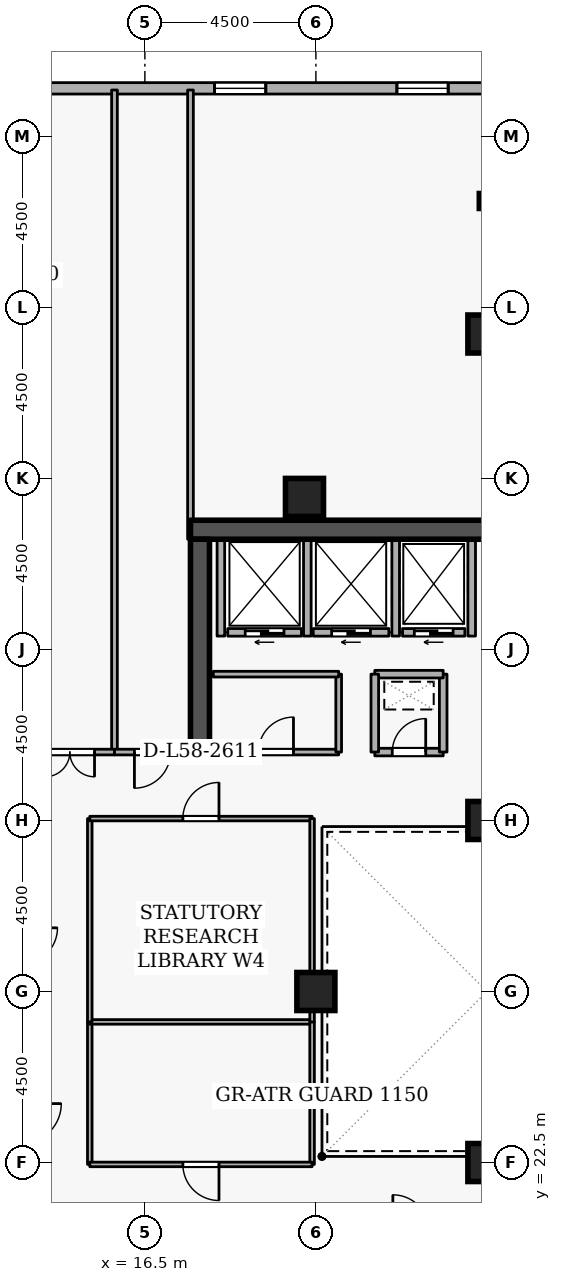
"""IFC4 building model, lengths in metres.
Left out: names, types, materials, properties, quantities, classifications, styles, units other than length and angle.
Written with IfcOpenShell. Run it as: python <this file> out.ifc"""

import sys

from ifc_helpers import new_model, si_unit, direction, frame, frame_2d, origin, origin_2d, place, context, subcontext, project, spatial, rectangle, i_section, extrude, element, fill, save


model = new_model("IFC4")
c1 = context("Model", 3, precision=1e-05, world=origin(), true_north=direction((0.0, 1.0)))
c2 = subcontext(c1, "Body", "Model", "MODEL_VIEW")
j1 = project(units=[si_unit("LENGTHUNIT", "METRE"), si_unit("PLANEANGLEUNIT", "RADIAN")], contexts=[c1])
p1 = place(None, origin())
s1 = spatial("IfcSite", under=j1, at=p1, CompositionType="ELEMENT")
p2 = place(p1, origin())
s2 = spatial("IfcBuilding", under=s1, at=p2, CompositionType="ELEMENT")
p3 = place(p2, frame((0.0, 0.0, 218.1)))
s3 = spatial("IfcBuildingStorey", under=s2, at=p3, CompositionType="ELEMENT", Elevation=218.1)
p4 = place(p3, frame((17.7, 39.15, 0.0), z_axis=(0.0, 0.0, 1.0), x_axis=(1.0, 0.0, 0.0)))
e1 = element("IfcWall", 1, at=p4, inside=s3, PredefinedType="SHEAR", context=c2, shape_type="SweptSolid", body=[
    extrude(rectangle(XDim=15.6, YDim=0.5, at=frame_2d((7.8, 0.0))), origin(), (0.0, 0.0, 1.0), 3.6),
])
p5 = place(p3, frame((17.95, 33.1, 0.0), z_axis=(0.0, 0.0, 1.0), x_axis=(0.0, 1.0, 0.0)))
e2 = element("IfcWall", 2, at=p5, inside=s3, PredefinedType="SHEAR", context=c2, shape_type="SweptSolid", body=[
    extrude(rectangle(XDim=5.8, YDim=0.5, at=frame_2d((2.9, 0.0))), origin(), (0.0, 0.0, 1.0), 3.6),
])
for number, where, z_axis, x_axis in (
    (3, (25.5, 44.3, 0.0), (0.0, 0.0, 1.0), (1.0, 0.0, 0.0)),
    (4, (20.7, 40.0, 0.0), (0.0, 0.0, 1.0), (1.0, 0.0, 0.0)),
    (5, (25.5, 22.5, 0.0), (0.0, 0.0, 1.0), (1.0, 0.0, 0.0)),
    (6, (25.5, 31.5, 0.0), (0.0, 0.0, 1.0), (1.0, 0.0, 0.0)),
    (7, (21.0, 27.0, 0.0), (0.0, 0.0, 1.0), (1.0, 0.0, 0.0)),
):
    element("IfcColumn", number, at=place(p3, frame(where, z_axis=z_axis, x_axis=x_axis)), inside=s3, PredefinedType="COLUMN", context=c2, shape_type="SweptSolid", body=[
        extrude(rectangle(XDim=1.0, YDim=1.0, at=origin_2d()), origin(), (0.0, 0.0, 1.0), 3.6),
    ])
p6 = place(p3, frame((25.5, 47.8, 0.0), z_axis=(0.0, 0.0, 1.0), x_axis=(1.0, 0.0, 0.0)))
e8 = element("IfcColumn", 8, at=p6, inside=s3, PredefinedType="COLUMN", context=c2, shape_type="SweptSolid", body=[
    extrude(i_section(OverallWidth=0.399, OverallDepth=0.394, WebThickness=0.023, FlangeThickness=0.037, FilletRadius=0.015, at=origin_2d()), origin(), (0.0, 0.0, 1.0), 3.6),
])
p7 = place(p3, frame((40.681, 50.765, 0.0), z_axis=(0.0, 0.0, 1.0), x_axis=(-0.999999999634, -2.7061402e-05, 0.0)))
e9 = element("IfcWall", 9, at=p7, inside=s3, PredefinedType="STANDARD", context=c2, shape_type="SweptSolid", body=[
    extrude(rectangle(XDim=36.087, YDim=0.3, at=frame_2d((18.043, 0.0))), origin(), (0.0, 0.0, 1.0), 2.66),
])
p8 = place(p7, frame((1.8, 0.0, 0.72)))
e10 = element("IfcOpeningElement", 10, at=p8, cuts=e9, PredefinedType="OPENING", context=c2, shape_type="SweptSolid", body=[
    extrude(rectangle(XDim=1.35, YDim=1.05, at=frame_2d((0.675, 0.525))), frame((0.0, 0.16, 0.0), z_axis=(0.0, -1.0, 0.0), x_axis=(1.0, 0.0, 0.0)), (0.0, 0.0, 1.0), 0.32),
])
p9 = place(p7, frame((6.6, 0.0, 0.72)))
e11 = element("IfcOpeningElement", 11, at=p9, cuts=e9, PredefinedType="OPENING", context=c2, shape_type="SweptSolid", body=[
    extrude(rectangle(XDim=1.35, YDim=1.05, at=frame_2d((0.675, 0.525))), frame((0.0, 0.16, 0.0), z_axis=(0.0, -1.0, 0.0), x_axis=(1.0, 0.0, 0.0)), (0.0, 0.0, 1.0), 0.32),
])
p10 = place(p7, frame((11.4, 0.0, 0.72)))
e12 = element("IfcOpeningElement", 12, at=p10, cuts=e9, PredefinedType="OPENING", context=c2, shape_type="SweptSolid", body=[
    extrude(rectangle(XDim=1.35, YDim=1.05, at=frame_2d((0.675, 0.525))), frame((0.0, 0.16, 0.0), z_axis=(0.0, -1.0, 0.0), x_axis=(1.0, 0.0, 0.0)), (0.0, 0.0, 1.0), 0.32),
])
p11 = place(p7, frame((16.2, 0.0, 0.72)))
e13 = element("IfcOpeningElement", 13, at=p11, cuts=e9, PredefinedType="OPENING", context=c2, shape_type="SweptSolid", body=[
    extrude(rectangle(XDim=1.35, YDim=1.05, at=frame_2d((0.675, 0.525))), frame((0.0, 0.16, 0.0), z_axis=(0.0, -1.0, 0.0), x_axis=(1.0, 0.0, 0.0)), (0.0, 0.0, 1.0), 0.32),
])
p12 = place(p7, frame((21.0, 0.0, 0.72)))
e14 = element("IfcOpeningElement", 14, at=p12, cuts=e9, PredefinedType="OPENING", context=c2, shape_type="SweptSolid", body=[
    extrude(rectangle(XDim=1.35, YDim=1.05, at=frame_2d((0.675, 0.525))), frame((0.0, 0.16, 0.0), z_axis=(0.0, -1.0, 0.0), x_axis=(1.0, 0.0, 0.0)), (0.0, 0.0, 1.0), 0.32),
])
p13 = place(p7, frame((30.6, 0.0, 0.72)))
e15 = element("IfcOpeningElement", 15, at=p13, cuts=e9, PredefinedType="OPENING", context=c2, shape_type="SweptSolid", body=[
    extrude(rectangle(XDim=1.35, YDim=1.05, at=frame_2d((0.675, 0.525))), frame((0.0, 0.16, 0.0), z_axis=(0.0, -1.0, 0.0), x_axis=(1.0, 0.0, 0.0)), (0.0, 0.0, 1.0), 0.32),
])
p14 = place(p3, frame((24.92, 36.45, 0.0), z_axis=(0.0, 0.0, 1.0), x_axis=(-1.0, 0.0, 0.0)))
e16 = element("IfcWall", 16, at=p14, inside=s3, PredefinedType="STANDARD", context=c2, shape_type="SweptSolid", body=[
    extrude(rectangle(XDim=1.64, YDim=0.2, at=frame_2d((0.82, 0.0))), origin(), (0.0, 0.0, 1.0), 3.26),
])
p15 = place(p14, frame((0.31, 0.0, 0.0)))
e17 = element("IfcOpeningElement", 17, at=p15, cuts=e16, PredefinedType="OPENING", context=c2, shape_type="SweptSolid", body=[
    extrude(rectangle(XDim=1.02, YDim=2.06, at=frame_2d((0.51, 1.03))), frame((0.0, 0.11, 0.0), z_axis=(0.0, -1.0, 0.0), x_axis=(1.0, 0.0, 0.0)), (0.0, 0.0, 1.0), 0.22),
])
p16 = place(p3, frame((22.92, 36.45, 0.0), z_axis=(0.0, 0.0, 1.0), x_axis=(-1.0, 0.0, 0.0)))
e18 = element("IfcWall", 18, at=p16, inside=s3, PredefinedType="STANDARD", context=c2, shape_type="SweptSolid", body=[
    extrude(rectangle(XDim=1.99, YDim=0.2, at=frame_2d((0.995, 0.0))), origin(), (0.0, 0.0, 1.0), 3.26),
])
p17 = place(p16, frame((0.485, 0.0, 0.0)))
e19 = element("IfcOpeningElement", 19, at=p17, cuts=e18, PredefinedType="OPENING", context=c2, shape_type="SweptSolid", body=[
    extrude(rectangle(XDim=1.02, YDim=2.06, at=frame_2d((0.51, 1.03))), frame((0.0, 0.11, 0.0), z_axis=(0.0, -1.0, 0.0), x_axis=(1.0, 0.0, 0.0)), (0.0, 0.0, 1.0), 0.22),
])
p18 = place(p3, frame((20.62, 36.45, 0.0), z_axis=(0.0, 0.0, 1.0), x_axis=(-1.0, 0.0, 0.0)))
e20 = element("IfcWall", 20, at=p18, inside=s3, PredefinedType="STANDARD", context=c2, shape_type="SweptSolid", body=[
    extrude(rectangle(XDim=1.94, YDim=0.2, at=frame_2d((0.97, 0.0))), origin(), (0.0, 0.0, 1.0), 3.26),
])
p19 = place(p18, frame((0.46, 0.0, 0.0)))
e21 = element("IfcOpeningElement", 21, at=p19, cuts=e20, PredefinedType="OPENING", context=c2, shape_type="SweptSolid", body=[
    extrude(rectangle(XDim=1.02, YDim=2.06, at=frame_2d((0.51, 1.03))), frame((0.0, 0.11, 0.0), z_axis=(0.0, -1.0, 0.0), x_axis=(1.0, 0.0, 0.0)), (0.0, 0.0, 1.0), 0.22),
])
for number, where, z_axis, x_axis in (
    (22, (25.1, 36.352, 0.0), (0.0, 0.0, 1.0), (0.0, 1.0, 0.0)),
    (23, (23.1, 36.352, 0.0), (0.0, 0.0, 1.0), (0.0, 1.0, 0.0)),
    (24, (20.775, 36.352, 0.0), (0.0, 0.0, 1.0), (0.0, 1.0, 0.0)),
    (25, (18.5, 36.352, 0.0), (0.0, 0.0, 1.0), (0.0, 1.0, 0.0)),
):
    element("IfcWall", number, at=place(p3, frame(where, z_axis=z_axis, x_axis=x_axis)), inside=s3, PredefinedType="STANDARD", context=c2, shape_type="SweptSolid", body=[
        extrude(rectangle(XDim=2.536, YDim=0.2, at=frame_2d((1.268, 0.0))), origin(), (0.0, 0.0, 1.0), 3.26),
    ])
p20 = place(p3, frame((22.55, 33.3, 0.0), z_axis=(0.0, 0.0, 1.0), x_axis=(1.0, 0.0, 0.0)))
e26 = element("IfcWall", 26, at=p20, inside=s3, PredefinedType="STANDARD", context=c2, shape_type="SweptSolid", body=[
    extrude(rectangle(XDim=1.8, YDim=0.2, at=frame_2d((0.9, 0.0))), origin(), (0.0, 0.0, 1.0), 3.26),
])
p21 = place(p20, frame((0.46, 0.0, 0.0)))
e27 = element("IfcOpeningElement", 27, at=p21, cuts=e26, PredefinedType="OPENING", context=c2, shape_type="SweptSolid", body=[
    extrude(rectangle(XDim=0.88, YDim=2.04, at=frame_2d((0.44, 1.02))), frame((0.0, 0.11, 0.0), z_axis=(0.0, -1.0, 0.0), x_axis=(1.0, 0.0, 0.0)), (0.0, 0.0, 1.0), 0.22),
])
p22 = place(p3, frame((24.35, 33.3, 0.0), z_axis=(0.0, 0.0, 1.0), x_axis=(0.0, 1.0, 0.0)))
e28 = element("IfcWall", 28, at=p22, inside=s3, PredefinedType="STANDARD", context=c2, shape_type="SweptSolid", body=[
    extrude(rectangle(XDim=2.05, YDim=0.2, at=frame_2d((1.025, 0.0))), origin(), (0.0, 0.0, 1.0), 3.26),
])
p23 = place(p3, frame((24.35, 35.35, 0.0), z_axis=(0.0, 0.0, 1.0), x_axis=(-1.0, 0.0, 0.0)))
e29 = element("IfcWall", 29, at=p23, inside=s3, PredefinedType="STANDARD", context=c2, shape_type="SweptSolid", body=[
    extrude(rectangle(XDim=1.8, YDim=0.2, at=frame_2d((0.9, 0.0))), origin(), (0.0, 0.0, 1.0), 3.26),
])
p24 = place(p3, frame((22.55, 35.35, 0.0), z_axis=(0.0, 0.0, 1.0), x_axis=(0.0, -1.0, 0.0)))
e30 = element("IfcWall", 30, at=p24, inside=s3, PredefinedType="STANDARD", context=c2, shape_type="SweptSolid", body=[
    extrude(rectangle(XDim=2.05, YDim=0.2, at=frame_2d((1.025, 0.0))), origin(), (0.0, 0.0, 1.0), 3.26),
])
p25 = place(p3, frame((18.3, 33.3, 0.0), z_axis=(0.0, 0.0, 1.0), x_axis=(1.0, 0.0, 0.0)))
e31 = element("IfcWall", 31, at=p25, inside=s3, PredefinedType="PARTITIONING", context=c2, shape_type="SweptSolid", body=[
    extrude(rectangle(XDim=3.3, YDim=0.15, at=frame_2d((1.65, 0.0))), origin(), (0.0, 0.0, 1.0), 3.26),
])
p26 = place(p25, frame((1.19, 0.0, 0.0)))
e32 = element("IfcOpeningElement", 32, at=p26, cuts=e31, PredefinedType="OPENING", context=c2, shape_type="SweptSolid", body=[
    extrude(rectangle(XDim=0.92, YDim=2.08, at=frame_2d((0.46, 1.04))), frame((0.0, 0.085, 0.0), z_axis=(0.0, -1.0, 0.0), x_axis=(1.0, 0.0, 0.0)), (0.0, 0.0, 1.0), 0.17),
])
p27 = place(p3, frame((21.6, 33.3, 0.0), z_axis=(0.0, 0.0, 1.0), x_axis=(0.0, 1.0, 0.0)))
e33 = element("IfcWall", 33, at=p27, inside=s3, PredefinedType="PARTITIONING", context=c2, shape_type="SweptSolid", body=[
    extrude(rectangle(XDim=2.05, YDim=0.15, at=frame_2d((1.025, 0.0))), origin(), (0.0, 0.0, 1.0), 3.26),
])
p28 = place(p3, frame((21.6, 35.35, 0.0), z_axis=(0.0, 0.0, 1.0), x_axis=(-1.0, 0.0, 0.0)))
e34 = element("IfcWall", 34, at=p28, inside=s3, PredefinedType="PARTITIONING", context=c2, shape_type="SweptSolid", body=[
    extrude(rectangle(XDim=3.3, YDim=0.15, at=frame_2d((1.65, 0.0))), origin(), (0.0, 0.0, 1.0), 3.26),
])
p29 = place(p3, frame((15.7, 50.72, 0.0), z_axis=(0.0, 0.0, 1.0), x_axis=(0.0, -1.0, 0.0)))
e35 = element("IfcWall", 35, at=p29, inside=s3, PredefinedType="PARTITIONING", context=c2, shape_type="SweptSolid", body=[
    extrude(rectangle(XDim=17.42, YDim=0.15, at=frame_2d((8.71, 0.0))), origin(), (0.0, 0.0, 1.0), 3.26),
])
p30 = place(p3, frame((15.7, 33.3, 0.0), z_axis=(0.0, 0.0, 1.0), x_axis=(-1.0, 0.0, 0.0)))
e36 = element("IfcWall", 36, at=p30, inside=s3, PredefinedType="PARTITIONING", context=c2, shape_type="SweptSolid", body=[
    extrude(rectangle(XDim=2.35, YDim=0.15, at=frame_2d((1.175, 0.0))), origin(), (0.0, 0.0, 1.0), 3.26),
])
p31 = place(p30, frame((0.525, 0.0, 0.0)))
e37 = element("IfcOpeningElement", 37, at=p31, cuts=e36, PredefinedType="OPENING", context=c2, shape_type="SweptSolid", body=[
    extrude(rectangle(XDim=1.3, YDim=2.12, at=frame_2d((0.65, 1.06))), frame((0.0, 0.085, 0.0), z_axis=(0.0, -1.0, 0.0), x_axis=(1.0, 0.0, 0.0)), (0.0, 0.0, 1.0), 0.17),
])
p32 = place(p3, frame((17.7, 50.72, 0.0), z_axis=(0.0, 0.0, 1.0), x_axis=(0.0, -1.0, 0.0)))
e38 = element("IfcWall", 38, at=p32, inside=s3, PredefinedType="PARTITIONING", context=c2, shape_type="SweptSolid", body=[
    extrude(rectangle(XDim=11.82, YDim=0.15, at=frame_2d((5.91, 0.0))), origin(), (0.0, 0.0, 1.0), 2.465),
])
p33 = place(p3, frame((17.7, 33.3, 0.0), z_axis=(0.0, 0.0, 1.0), x_axis=(-1.0, 0.0, 0.0)))
e39 = element("IfcWall", 39, at=p33, inside=s3, PredefinedType="PARTITIONING", context=c2, shape_type="SweptSolid", body=[
    extrude(rectangle(XDim=2.0, YDim=0.15, at=frame_2d((1.0, 0.0))), origin(), (0.0, 0.0, 1.0), 3.26),
])
p34 = place(p33, frame((0.525, 0.0, 0.0)))
e40 = element("IfcOpeningElement", 40, at=p34, cuts=e39, PredefinedType="OPENING", context=c2, shape_type="SweptSolid", body=[
    extrude(rectangle(XDim=0.95, YDim=2.1, at=frame_2d((0.475, 1.05))), frame((0.0, 0.085, 0.0), z_axis=(0.0, -1.0, 0.0), x_axis=(1.0, 0.0, 0.0)), (0.0, 0.0, 1.0), 0.17),
])
p35 = place(p3, frame((15.05, 22.45, 0.0), z_axis=(0.0, 0.0, 1.0), x_axis=(0.0, 1.0, 0.0)))
e41 = element("IfcWall", 41, at=p35, inside=s3, PredefinedType="PARTITIONING", context=c2, shape_type="SweptSolid", body=[
    extrude(rectangle(XDim=3.75, YDim=0.12, at=frame_2d((1.875, 0.0))), origin(), (0.0, 0.0, 1.0), 3.26),
])
p36 = place(p3, frame((15.05, 26.2, 0.0), z_axis=(0.0, 0.0, 1.0), x_axis=(1.0, 0.0, 0.0)))
e42 = element("IfcWall", 42, at=p36, inside=s3, PredefinedType="PARTITIONING", context=c2, shape_type="SweptSolid", body=[
    extrude(rectangle(XDim=5.85, YDim=0.12, at=frame_2d((2.925, 0.0))), origin(), (0.0, 0.0, 1.0), 3.26),
])
p37 = place(p3, frame((20.9, 26.2, 0.0), z_axis=(0.0, 0.0, 1.0), x_axis=(0.0, -1.0, 0.0)))
e43 = element("IfcWall", 43, at=p37, inside=s3, PredefinedType="PARTITIONING", context=c2, shape_type="SweptSolid", body=[
    extrude(rectangle(XDim=3.75, YDim=0.12, at=frame_2d((1.875, 0.0))), origin(), (0.0, 0.0, 1.0), 3.26),
])
p38 = place(p3, frame((20.9, 22.45, 0.0), z_axis=(0.0, 0.0, 1.0), x_axis=(-1.0, 0.0, 0.0)))
e44 = element("IfcWall", 44, at=p38, inside=s3, PredefinedType="PARTITIONING", context=c2, shape_type="SweptSolid", body=[
    extrude(rectangle(XDim=5.85, YDim=0.12, at=frame_2d((2.925, 0.0))), origin(), (0.0, 0.0, 1.0), 3.26),
])
p39 = place(p38, frame((2.45, 0.0, 0.0)))
e45 = element("IfcOpeningElement", 45, at=p39, cuts=e44, PredefinedType="OPENING", context=c2, shape_type="SweptSolid", body=[
    extrude(rectangle(XDim=0.95, YDim=2.1, at=frame_2d((0.475, 1.05))), frame((0.0, 0.07, 0.0), z_axis=(0.0, -1.0, 0.0), x_axis=(1.0, 0.0, 0.0)), (0.0, 0.0, 1.0), 0.14),
])
p40 = place(p3, frame((15.05, 26.2, 0.0), z_axis=(0.0, 0.0, 1.0), x_axis=(0.0, 1.0, 0.0)))
e46 = element("IfcWall", 46, at=p40, inside=s3, PredefinedType="PARTITIONING", context=c2, shape_type="SweptSolid", body=[
    extrude(rectangle(XDim=5.35, YDim=0.12, at=frame_2d((2.675, 0.0))), origin(), (0.0, 0.0, 1.0), 3.26),
])
p41 = place(p3, frame((15.05, 31.55, 0.0), z_axis=(0.0, 0.0, 1.0), x_axis=(1.0, 0.0, 0.0)))
e47 = element("IfcWall", 47, at=p41, inside=s3, PredefinedType="PARTITIONING", context=c2, shape_type="SweptSolid", body=[
    extrude(rectangle(XDim=5.85, YDim=0.12, at=frame_2d((2.925, 0.0))), origin(), (0.0, 0.0, 1.0), 3.26),
])
p42 = place(p41, frame((2.45, 0.0, 0.0)))
e48 = element("IfcOpeningElement", 48, at=p42, cuts=e47, PredefinedType="OPENING", context=c2, shape_type="SweptSolid", body=[
    extrude(rectangle(XDim=0.95, YDim=2.1, at=frame_2d((0.475, 1.05))), frame((0.0, 0.07, 0.0), z_axis=(0.0, -1.0, 0.0), x_axis=(1.0, 0.0, 0.0)), (0.0, 0.0, 1.0), 0.14),
])
p43 = place(p3, frame((20.9, 31.55, 0.0), z_axis=(0.0, 0.0, 1.0), x_axis=(0.0, -1.0, 0.0)))
e49 = element("IfcWall", 49, at=p43, inside=s3, PredefinedType="PARTITIONING", context=c2, shape_type="SweptSolid", body=[
    extrude(rectangle(XDim=5.35, YDim=0.12, at=frame_2d((2.675, 0.0))), origin(), (0.0, 0.0, 1.0), 3.26),
])
p44 = place(p11, origin())
e50 = element("IfcWindow", 50, at=p44, inside=s3, PartitioningType="SINGLE_PANEL", PredefinedType="WINDOW", context=c2, shape_type="SweptSolid", body=[
    extrude(rectangle(XDim=1.35, YDim=1.05, at=frame_2d((0.675, 0.525))), frame((0.0, 0.03, 0.0), z_axis=(0.0, -1.0, 0.0), x_axis=(1.0, 0.0, 0.0)), (0.0, 0.0, 1.0), 0.06),
])
fill(e13, e50)
p45 = place(p12, origin())
e51 = element("IfcWindow", 51, at=p45, inside=s3, PartitioningType="SINGLE_PANEL", PredefinedType="WINDOW", context=c2, shape_type="SweptSolid", body=[
    extrude(rectangle(XDim=1.35, YDim=1.05, at=frame_2d((0.675, 0.525))), frame((0.0, 0.03, 0.0), z_axis=(0.0, -1.0, 0.0), x_axis=(1.0, 0.0, 0.0)), (0.0, 0.0, 1.0), 0.06),
])
fill(e14, e51)
p46 = place(p15, origin())
e52 = element("IfcDoor", 52, at=p46, inside=s3, OperationType="SLIDING_TO_LEFT", PredefinedType="DOOR", context=c2, shape_type="SweptSolid", body=[
    extrude(rectangle(XDim=1.02, YDim=2.06, at=frame_2d((0.51, 1.03))), frame((0.0, 0.025, 0.0), z_axis=(0.0, -1.0, 0.0), x_axis=(1.0, 0.0, 0.0)), (0.0, 0.0, 1.0), 0.05),
])
fill(e17, e52)
p47 = place(p17, origin())
e53 = element("IfcDoor", 53, at=p47, inside=s3, OperationType="SLIDING_TO_LEFT", PredefinedType="DOOR", context=c2, shape_type="SweptSolid", body=[
    extrude(rectangle(XDim=1.02, YDim=2.06, at=frame_2d((0.51, 1.03))), frame((0.0, 0.025, 0.0), z_axis=(0.0, -1.0, 0.0), x_axis=(1.0, 0.0, 0.0)), (0.0, 0.0, 1.0), 0.05),
])
fill(e19, e53)
p48 = place(p19, origin())
e54 = element("IfcDoor", 54, at=p48, inside=s3, OperationType="SLIDING_TO_LEFT", PredefinedType="DOOR", context=c2, shape_type="SweptSolid", body=[
    extrude(rectangle(XDim=1.02, YDim=2.06, at=frame_2d((0.51, 1.03))), frame((0.0, 0.025, 0.0), z_axis=(0.0, -1.0, 0.0), x_axis=(1.0, 0.0, 0.0)), (0.0, 0.0, 1.0), 0.05),
])
fill(e21, e54)
p49 = place(p21, origin())
e55 = element("IfcDoor", 55, at=p49, inside=s3, OperationType="SINGLE_SWING_RIGHT", PredefinedType="DOOR", context=c2, shape_type="SweptSolid", body=[
    extrude(rectangle(XDim=0.88, YDim=2.04, at=frame_2d((0.44, 1.02))), frame((0.0, 0.025, 0.0), z_axis=(0.0, -1.0, 0.0), x_axis=(1.0, 0.0, 0.0)), (0.0, 0.0, 1.0), 0.05),
])
fill(e27, e55)
p50 = place(p26, origin())
e56 = element("IfcDoor", 56, at=p50, inside=s3, OperationType="SINGLE_SWING_RIGHT", PredefinedType="DOOR", context=c2, shape_type="SweptSolid", body=[
    extrude(rectangle(XDim=0.92, YDim=2.08, at=frame_2d((0.46, 1.04))), frame((0.0, 0.025, 0.0), z_axis=(0.0, -1.0, 0.0), x_axis=(1.0, 0.0, 0.0)), (0.0, 0.0, 1.0), 0.05),
])
fill(e32, e56)
p51 = place(p31, origin())
e57 = element("IfcDoor", 57, at=p51, inside=s3, OperationType="DOUBLE_DOOR_SINGLE_SWING", PredefinedType="DOOR", context=c2, shape_type="SweptSolid", body=[
    extrude(rectangle(XDim=1.3, YDim=2.12, at=frame_2d((0.65, 1.06))), frame((0.0, 0.025, 0.0), z_axis=(0.0, -1.0, 0.0), x_axis=(1.0, 0.0, 0.0)), (0.0, 0.0, 1.0), 0.05),
])
fill(e37, e57)
p52 = place(p34, origin())
e58 = element("IfcDoor", 58, at=p52, inside=s3, OperationType="SINGLE_SWING_RIGHT", PredefinedType="DOOR", context=c2, shape_type="SweptSolid", body=[
    extrude(rectangle(XDim=0.95, YDim=2.1, at=frame_2d((0.475, 1.05))), frame((0.0, 0.025, 0.0), z_axis=(0.0, -1.0, 0.0), x_axis=(1.0, 0.0, 0.0)), (0.0, 0.0, 1.0), 0.05),
])
fill(e40, e58)
p53 = place(p39, origin())
e59 = element("IfcDoor", 59, at=p53, inside=s3, OperationType="SINGLE_SWING_LEFT", PredefinedType="DOOR", context=c2, shape_type="SweptSolid", body=[
    extrude(rectangle(XDim=0.95, YDim=2.1, at=frame_2d((0.475, 1.05))), frame((0.0, 0.025, 0.0), z_axis=(0.0, -1.0, 0.0), x_axis=(1.0, 0.0, 0.0)), (0.0, 0.0, 1.0), 0.05),
])
fill(e45, e59)
p54 = place(p42, origin())
e60 = element("IfcDoor", 60, at=p54, inside=s3, OperationType="SINGLE_SWING_RIGHT", PredefinedType="DOOR", context=c2, shape_type="SweptSolid", body=[
    extrude(rectangle(XDim=0.95, YDim=2.1, at=frame_2d((0.475, 1.05))), frame((0.0, 0.025, 0.0), z_axis=(0.0, -1.0, 0.0), x_axis=(1.0, 0.0, 0.0)), (0.0, 0.0, 1.0), 0.05),
])
fill(e48, e60)
save(model, sys.argv[1])
